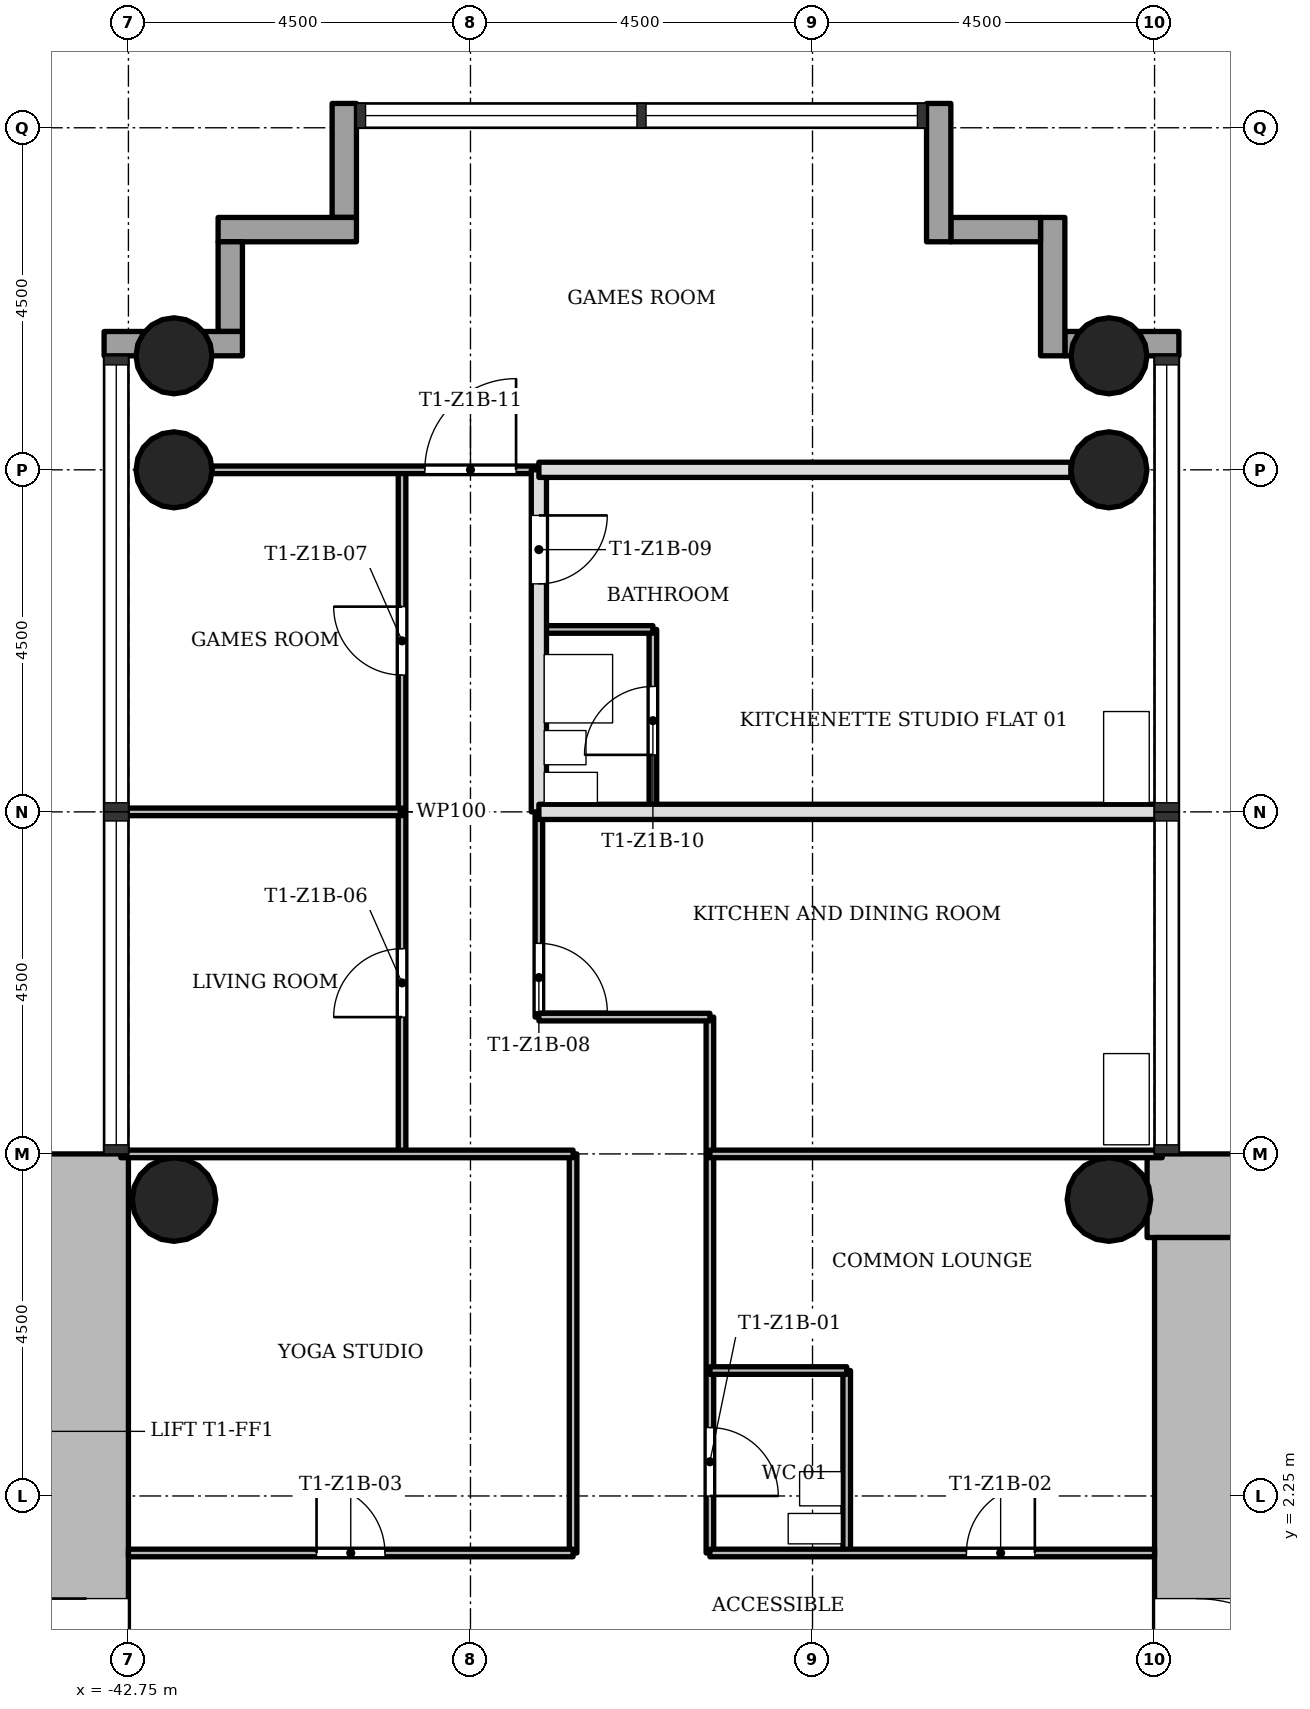
"""IFC4 building model, lengths in metres.
Left out: names, types, materials, properties, quantities, classifications, styles, units other than length and angle.
Written with IfcOpenShell. Run it as: python <this file> out.ifc"""

import sys

from ifc_helpers import new_model, si_unit, direction, frame, frame_2d, origin, origin_2d, place, context, subcontext, project, spatial, rectangle, hollow_circle, extrude, element, fill, save


model = new_model("IFC4")
c1 = context("Model", 3, precision=1e-05, world=origin(), true_north=direction((0.0, 1.0)))
c2 = subcontext(c1, "Body", "Model", "MODEL_VIEW")
j1 = project(units=[si_unit("LENGTHUNIT", "METRE"), si_unit("PLANEANGLEUNIT", "RADIAN")], contexts=[c1])
p1 = place(None, origin())
s1 = spatial("IfcSite", under=j1, at=p1, CompositionType="ELEMENT")
p2 = place(p1, origin())
s2 = spatial("IfcBuilding", under=s1, at=p2, CompositionType="ELEMENT")
p3 = place(p2, frame((0.0, 0.0, 41.5)))
s3 = spatial("IfcBuildingStorey", under=s2, at=p3, CompositionType="ELEMENT", Elevation=41.5)
p4 = place(p3, frame((-21.35, 6.2, 0.0), z_axis=(0.0, 0.0, 1.0), x_axis=(-1.0, 0.0, 0.0)))
e1 = element("IfcWall", 1, at=p4, inside=s3, PredefinedType="SHEAR", context=c2, shape_type="SweptSolid", body=[
    extrude(rectangle(XDim=7.998, YDim=1.1, at=frame_2d((3.999, 0.0))), origin(), (0.0, 0.0, 1.0), 3.4),
])
p5 = place(p3, frame((-28.7, 5.65, 0.0), z_axis=(0.0, 0.0, 1.0), x_axis=(0.0, -1.0, 0.0)))
e2 = element("IfcWall", 2, at=p5, inside=s3, PredefinedType="SHEAR", context=c2, shape_type="SweptSolid", body=[
    extrude(rectangle(XDim=12.4, YDim=1.1, at=frame_2d((6.2, 0.0))), origin(), (0.0, 0.0, 1.0), 3.4),
])
p6 = place(p5, frame((4.75, 0.0, 0.0)))
e3 = element("IfcOpeningElement", 3, at=p6, cuts=e2, PredefinedType="OPENING", context=c2, shape_type="SweptSolid", body=[
    extrude(rectangle(XDim=1.8, YDim=2.1, at=frame_2d((0.9, 1.05))), frame((0.0, 0.56, 0.0), z_axis=(0.0, -1.0, 0.0), x_axis=(1.0, 0.0, 0.0)), (0.0, 0.0, 1.0), 1.12),
])
p7 = place(p3, frame((-43.3, -5.65, 0.0), z_axis=(0.0, 0.0, 1.0), x_axis=(0.0, 1.0, 0.0)))
e4 = element("IfcWall", 4, at=p7, inside=s3, PredefinedType="SHEAR", context=c2, shape_type="SweptSolid", body=[
    extrude(rectangle(XDim=12.4, YDim=1.1, at=frame_2d((6.2, 0.0))), origin(), (0.0, 0.0, 1.0), 3.4),
])
p8 = place(p7, frame((4.75, 0.0, 0.0)))
e5 = element("IfcOpeningElement", 5, at=p8, cuts=e4, PredefinedType="OPENING", context=c2, shape_type="SweptSolid", body=[
    extrude(rectangle(XDim=1.8, YDim=2.1, at=frame_2d((0.9, 1.05))), frame((0.0, 0.56, 0.0), z_axis=(0.0, -1.0, 0.0), x_axis=(1.0, 0.0, 0.0)), (0.0, 0.0, 1.0), 1.12),
])
for number, where, z_axis, x_axis in (
    (6, (-29.85, 15.75, 0.0), (0.0, 0.0, 1.0), (1.0, 0.0, 0.0)),
    (7, (-42.15, 15.75, 0.0), (0.0, 0.0, 1.0), (1.0, 0.0, 0.0)),
    (8, (-29.85, 17.25, 0.0), (0.0, 0.0, 1.0), (1.0, 0.0, 0.0)),
    (9, (-42.15, 17.25, 0.0), (0.0, 0.0, 1.0), (1.0, 0.0, 0.0)),
):
    element("IfcColumn", number, at=place(p3, frame(where, z_axis=z_axis, x_axis=x_axis)), inside=s3, PredefinedType="COLUMN", context=c2, shape_type="SweptSolid", body=[
        extrude(hollow_circle(Radius=0.5, WallThickness=0.036, at=origin_2d()), origin(), (0.0, 0.0, 1.0), 3.4),
    ])
for number, where, z_axis, x_axis in (
    (10, (-29.85, 6.15, 0.0), (0.0, 0.0, 1.0), (1.0, 0.0, 0.0)),
    (11, (-42.15, 6.15, 0.0), (0.0, 0.0, 1.0), (1.0, 0.0, 0.0)),
):
    element("IfcColumn", number, at=place(p3, frame(where, z_axis=z_axis, x_axis=x_axis)), inside=s3, PredefinedType="COLUMN", context=c2, shape_type="SweptSolid", body=[
        extrude(hollow_circle(Radius=0.55, WallThickness=0.04, at=origin_2d()), origin(), (0.0, 0.0, 1.0), 3.4),
    ])
p9 = place(p3, frame((-28.93, 17.41, -0.3), z_axis=(0.0, 0.0, 1.0), x_axis=(-1.0, 0.0, 0.0)))
e12 = element("IfcWall", 12, at=p9, inside=s3, PredefinedType="STANDARD", context=c2, shape_type="SweptSolid", body=[
    extrude(rectangle(XDim=1.5, YDim=0.32, at=frame_2d((0.75, 0.0))), origin(), (0.0, 0.0, 1.0), 3.4),
])
p10 = place(p3, frame((-30.59, 17.25, -0.3), z_axis=(0.0, 0.0, 1.0), x_axis=(0.0, 1.0, 0.0)))
e13 = element("IfcWall", 13, at=p10, inside=s3, PredefinedType="STANDARD", context=c2, shape_type="SweptSolid", body=[
    extrude(rectangle(XDim=1.82, YDim=0.32, at=frame_2d((0.91, 0.0))), origin(), (0.0, 0.0, 1.0), 3.4),
])
p11 = place(p3, frame((-30.75, 18.91, -0.3), z_axis=(0.0, 0.0, 1.0), x_axis=(-1.0, 0.0, 0.0)))
e14 = element("IfcWall", 14, at=p11, inside=s3, PredefinedType="STANDARD", context=c2, shape_type="SweptSolid", body=[
    extrude(rectangle(XDim=1.18, YDim=0.32, at=frame_2d((0.59, 0.0))), origin(), (0.0, 0.0, 1.0), 3.4),
])
p12 = place(p3, frame((-32.09, 18.75, -0.3), z_axis=(0.0, 0.0, 1.0), x_axis=(0.0, 1.0, 0.0)))
e15 = element("IfcWall", 15, at=p12, inside=s3, PredefinedType="STANDARD", context=c2, shape_type="SweptSolid", body=[
    extrude(rectangle(XDim=1.82, YDim=0.32, at=frame_2d((0.91, 0.0))), origin(), (0.0, 0.0, 1.0), 3.4),
])
p13 = place(p3, frame((-39.91, 20.57, -0.3), z_axis=(0.0, 0.0, 1.0), x_axis=(0.0, -1.0, 0.0)))
e16 = element("IfcWall", 16, at=p13, inside=s3, PredefinedType="STANDARD", context=c2, shape_type="SweptSolid", body=[
    extrude(rectangle(XDim=1.5, YDim=0.32, at=frame_2d((0.75, 0.0))), origin(), (0.0, 0.0, 1.0), 3.4),
])
p14 = place(p3, frame((-39.75, 18.91, -0.3), z_axis=(0.0, 0.0, 1.0), x_axis=(-1.0, 0.0, 0.0)))
e17 = element("IfcWall", 17, at=p14, inside=s3, PredefinedType="STANDARD", context=c2, shape_type="SweptSolid", body=[
    extrude(rectangle(XDim=1.82, YDim=0.32, at=frame_2d((0.91, 0.0))), origin(), (0.0, 0.0, 1.0), 3.4),
])
p15 = place(p3, frame((-41.41, 18.75, -0.3), z_axis=(0.0, 0.0, 1.0), x_axis=(0.0, -1.0, 0.0)))
e18 = element("IfcWall", 18, at=p15, inside=s3, PredefinedType="STANDARD", context=c2, shape_type="SweptSolid", body=[
    extrude(rectangle(XDim=1.18, YDim=0.32, at=frame_2d((0.59, 0.0))), origin(), (0.0, 0.0, 1.0), 3.4),
])
p16 = place(p3, frame((-41.25, 17.41, -0.3), z_axis=(0.0, 0.0, 1.0), x_axis=(-1.0, 0.0, 0.0)))
e19 = element("IfcWall", 19, at=p16, inside=s3, PredefinedType="STANDARD", context=c2, shape_type="SweptSolid", body=[
    extrude(rectangle(XDim=1.82, YDim=0.32, at=frame_2d((0.91, 0.0))), origin(), (0.0, 0.0, 1.0), 3.4),
])
p17 = place(p3, frame((-39.15, 6.75, 0.0), z_axis=(0.0, 0.0, 1.0), x_axis=(0.0, 1.0, 0.0)))
e20 = element("IfcWall", 20, at=p17, inside=s3, PredefinedType="PARTITIONING", context=c2, shape_type="SweptSolid", body=[
    extrude(rectangle(XDim=9.0, YDim=0.1, at=frame_2d((4.5, 0.0))), origin(), (0.0, 0.0, 1.0), 3.0),
])
p18 = place(p17, frame((1.8, 0.0, 0.0)))
e21 = element("IfcOpeningElement", 21, at=p18, cuts=e20, PredefinedType="OPENING", context=c2, shape_type="SweptSolid", body=[
    extrude(rectangle(XDim=0.9, YDim=2.1, at=frame_2d((0.45, 1.05))), frame((0.0, 0.06, 0.0), z_axis=(0.0, -1.0, 0.0), x_axis=(1.0, 0.0, 0.0)), (0.0, 0.0, 1.0), 0.12),
])
p19 = place(p17, frame((6.3, 0.0, 0.0)))
e22 = element("IfcOpeningElement", 22, at=p19, cuts=e20, PredefinedType="OPENING", context=c2, shape_type="SweptSolid", body=[
    extrude(rectangle(XDim=0.9, YDim=2.1, at=frame_2d((0.45, 1.05))), frame((0.0, 0.06, 0.0), z_axis=(0.0, -1.0, 0.0), x_axis=(1.0, 0.0, 0.0)), (0.0, 0.0, 1.0), 0.12),
])
p20 = place(p3, frame((-37.35, 8.55, 0.0), z_axis=(0.0, 0.0, 1.0), x_axis=(0.0, 1.0, 0.0)))
e23 = element("IfcWall", 23, at=p20, inside=s3, PredefinedType="PARTITIONING", context=c2, shape_type="SweptSolid", body=[
    extrude(rectangle(XDim=2.7, YDim=0.1, at=frame_2d((1.35, 0.0))), origin(), (0.0, 0.0, 1.0), 3.0),
])
p21 = place(p20, frame((0.07, 0.0, 0.0)))
e24 = element("IfcOpeningElement", 24, at=p21, cuts=e23, PredefinedType="OPENING", context=c2, shape_type="SweptSolid", body=[
    extrude(rectangle(XDim=0.9, YDim=2.1, at=frame_2d((0.45, 1.05))), frame((0.0, 0.06, 0.0), z_axis=(0.0, -1.0, 0.0), x_axis=(1.0, 0.0, 0.0)), (0.0, 0.0, 1.0), 0.12),
])
p22 = place(p3, frame((-37.35, 11.25, 0.0), z_axis=(0.0, 0.0, 1.0), x_axis=(0.0, 1.0, 0.0)))
e25 = element("IfcWall", 25, at=p22, inside=s3, PredefinedType="SOLIDWALL", context=c2, shape_type="SweptSolid", body=[
    extrude(rectangle(XDim=4.5, YDim=0.2, at=frame_2d((2.25, 0.0))), origin(), (0.0, 0.0, 1.0), 3.0),
])
p23 = place(p22, frame((3.0, 0.0, 0.0)))
e26 = element("IfcOpeningElement", 26, at=p23, cuts=e25, PredefinedType="OPENING", context=c2, shape_type="SweptSolid", body=[
    extrude(rectangle(XDim=0.9, YDim=2.1, at=frame_2d((0.45, 1.05))), frame((0.0, 0.11, 0.0), z_axis=(0.0, -1.0, 0.0), x_axis=(1.0, 0.0, 0.0)), (0.0, 0.0, 1.0), 0.22),
])
p24 = place(p3, frame((-36.9, 1.5, 0.0), z_axis=(0.0, 0.0, 1.0), x_axis=(0.0, 1.0, 0.0)))
e27 = element("IfcWall", 27, at=p24, inside=s3, PredefinedType="PARTITIONING", context=c2, shape_type="SweptSolid", body=[
    extrude(rectangle(XDim=5.25, YDim=0.1, at=frame_2d((2.625, 0.0))), origin(), (0.0, 0.0, 1.0), 3.0),
])
p25 = place(p3, frame((-35.85, 11.25, 0.0), z_axis=(0.0, 0.0, 1.0), x_axis=(0.0, 1.0, 0.0)))
e28 = element("IfcWall", 28, at=p25, inside=s3, PredefinedType="PARTITIONING", context=c2, shape_type="SweptSolid", body=[
    extrude(rectangle(XDim=2.4, YDim=0.1, at=frame_2d((1.2, 0.0))), origin(), (0.0, 0.0, 1.0), 3.0),
])
p26 = place(p25, frame((0.75, 0.0, 0.0)))
e29 = element("IfcOpeningElement", 29, at=p26, cuts=e28, PredefinedType="OPENING", context=c2, shape_type="SweptSolid", body=[
    extrude(rectangle(XDim=0.9, YDim=2.1, at=frame_2d((0.45, 1.05))), frame((0.0, 0.06, 0.0), z_axis=(0.0, -1.0, 0.0), x_axis=(1.0, 0.0, 0.0)), (0.0, 0.0, 1.0), 0.12),
])
p27 = place(p3, frame((-35.1, 1.5, 0.0), z_axis=(0.0, 0.0, 1.0), x_axis=(0.0, 1.0, 0.0)))
e30 = element("IfcWall", 30, at=p27, inside=s3, PredefinedType="PARTITIONING", context=c2, shape_type="SweptSolid", body=[
    extrude(rectangle(XDim=7.05, YDim=0.1, at=frame_2d((3.525, 0.0))), origin(), (0.0, 0.0, 1.0), 3.0),
])
p28 = place(p27, frame((0.75, 0.0, 0.0)))
e31 = element("IfcOpeningElement", 31, at=p28, cuts=e30, PredefinedType="OPENING", context=c2, shape_type="SweptSolid", body=[
    extrude(rectangle(XDim=0.9, YDim=2.1, at=frame_2d((0.45, 1.05))), frame((0.0, 0.06, 0.0), z_axis=(0.0, -1.0, 0.0), x_axis=(1.0, 0.0, 0.0)), (0.0, 0.0, 1.0), 0.12),
])
p29 = place(p3, frame((-33.3, 1.5, 0.0), z_axis=(0.0, 0.0, 1.0), x_axis=(0.0, 1.0, 0.0)))
e32 = element("IfcWall", 32, at=p29, inside=s3, PredefinedType="PARTITIONING", context=c2, shape_type="SweptSolid", body=[
    extrude(rectangle(XDim=2.4, YDim=0.1, at=frame_2d((1.2, 0.0))), origin(), (0.0, 0.0, 1.0), 3.0),
])
p30 = place(p3, frame((-42.75, 1.5, 0.0), z_axis=(0.0, 0.0, 1.0), x_axis=(1.0, 0.0, 0.0)))
e33 = element("IfcWall", 33, at=p30, inside=s3, PredefinedType="PARTITIONING", context=c2, shape_type="SweptSolid", body=[
    extrude(rectangle(XDim=5.85, YDim=0.1, at=frame_2d((2.925, 0.0))), origin(), (0.0, 0.0, 1.0), 3.0),
])
p31 = place(p30, frame((2.475, 0.0, 0.0)))
e34 = element("IfcOpeningElement", 34, at=p31, cuts=e33, PredefinedType="OPENING", context=c2, shape_type="SweptSolid", body=[
    extrude(rectangle(XDim=0.9, YDim=2.1, at=frame_2d((0.45, 1.05))), frame((0.0, 0.06, 0.0), z_axis=(0.0, -1.0, 0.0), x_axis=(1.0, 0.0, 0.0)), (0.0, 0.0, 1.0), 0.12),
])
p32 = place(p3, frame((-35.1, 1.5, 0.0), z_axis=(0.0, 0.0, 1.0), x_axis=(1.0, 0.0, 0.0)))
e35 = element("IfcWall", 35, at=p32, inside=s3, PredefinedType="PARTITIONING", context=c2, shape_type="SweptSolid", body=[
    extrude(rectangle(XDim=5.85, YDim=0.1, at=frame_2d((2.925, 0.0))), origin(), (0.0, 0.0, 1.0), 3.0),
])
p33 = place(p32, frame((3.375, 0.0, 0.0)))
e36 = element("IfcOpeningElement", 36, at=p33, cuts=e35, PredefinedType="OPENING", context=c2, shape_type="SweptSolid", body=[
    extrude(rectangle(XDim=0.9, YDim=2.1, at=frame_2d((0.45, 1.05))), frame((0.0, 0.06, 0.0), z_axis=(0.0, -1.0, 0.0), x_axis=(1.0, 0.0, 0.0)), (0.0, 0.0, 1.0), 0.12),
])
p34 = place(p3, frame((-35.1, 3.9, 0.0), z_axis=(0.0, 0.0, 1.0), x_axis=(1.0, 0.0, 0.0)))
e37 = element("IfcWall", 37, at=p34, inside=s3, PredefinedType="PARTITIONING", context=c2, shape_type="SweptSolid", body=[
    extrude(rectangle(XDim=1.8, YDim=0.1, at=frame_2d((0.9, 0.0))), origin(), (0.0, 0.0, 1.0), 3.0),
])
for number, where, z_axis, x_axis in (
    (38, (-42.85, 6.75, 0.0), (0.0, 0.0, 1.0), (1.0, 0.0, 0.0)),
    (39, (-35.1, 6.75, 0.0), (0.0, 0.0, 1.0), (1.0, 0.0, 0.0)),
):
    element("IfcWall", number, at=place(p3, frame(where, z_axis=z_axis, x_axis=x_axis)), inside=s3, PredefinedType="PARTITIONING", context=c2, shape_type="SweptSolid", body=[
        extrude(rectangle(XDim=5.95, YDim=0.1, at=frame_2d((2.975, 0.0))), origin(), (0.0, 0.0, 1.0), 3.0),
    ])
p35 = place(p3, frame((-37.35, 8.55, 0.0), z_axis=(0.0, 0.0, 1.0), x_axis=(1.0, 0.0, 0.0)))
e40 = element("IfcWall", 40, at=p35, inside=s3, PredefinedType="PARTITIONING", context=c2, shape_type="SweptSolid", body=[
    extrude(rectangle(XDim=2.25, YDim=0.1, at=frame_2d((1.125, 0.0))), origin(), (0.0, 0.0, 1.0), 3.0),
])
p36 = place(p3, frame((-42.85, 11.25, 0.0), z_axis=(0.0, 0.0, 1.0), x_axis=(1.0, 0.0, 0.0)))
e41 = element("IfcWall", 41, at=p36, inside=s3, PredefinedType="PARTITIONING", context=c2, shape_type="SweptSolid", body=[
    extrude(rectangle(XDim=3.7, YDim=0.1, at=frame_2d((1.85, 0.0))), origin(), (0.0, 0.0, 1.0), 3.0),
])
p37 = place(p3, frame((-37.35, 11.25, 0.0), z_axis=(0.0, 0.0, 1.0), x_axis=(1.0, 0.0, 0.0)))
e42 = element("IfcWall", 42, at=p37, inside=s3, PredefinedType="SOLIDWALL", context=c2, shape_type="SweptSolid", body=[
    extrude(rectangle(XDim=8.2, YDim=0.2, at=frame_2d((4.1, 0.0))), origin(), (0.0, 0.0, 1.0), 3.0),
])
p38 = place(p3, frame((-37.35, 13.65, 0.0), z_axis=(0.0, 0.0, 1.0), x_axis=(1.0, 0.0, 0.0)))
e43 = element("IfcWall", 43, at=p38, inside=s3, PredefinedType="PARTITIONING", context=c2, shape_type="SweptSolid", body=[
    extrude(rectangle(XDim=1.5, YDim=0.1, at=frame_2d((0.75, 0.0))), origin(), (0.0, 0.0, 1.0), 3.0),
])
p39 = place(p3, frame((-41.65, 15.75, 0.0), z_axis=(0.0, 0.0, 1.0), x_axis=(1.0, 0.0, 0.0)))
e44 = element("IfcWall", 44, at=p39, inside=s3, PredefinedType="PARTITIONING", context=c2, shape_type="SweptSolid", body=[
    extrude(rectangle(XDim=4.3, YDim=0.1, at=frame_2d((2.15, 0.0))), origin(), (0.0, 0.0, 1.0), 3.0),
])
p40 = place(p39, frame((2.8, 0.0, 0.0)))
e45 = element("IfcOpeningElement", 45, at=p40, cuts=e44, PredefinedType="OPENING", context=c2, shape_type="SweptSolid", body=[
    extrude(rectangle(XDim=1.2, YDim=2.1, at=frame_2d((0.6, 1.05))), frame((0.0, 0.06, 0.0), z_axis=(0.0, -1.0, 0.0), x_axis=(1.0, 0.0, 0.0)), (0.0, 0.0, 1.0), 0.12),
])
p41 = place(p3, frame((-37.35, 15.75, 0.0), z_axis=(0.0, 0.0, 1.0), x_axis=(1.0, 0.0, 0.0)))
e46 = element("IfcWall", 46, at=p41, inside=s3, PredefinedType="SOLIDWALL", context=c2, shape_type="SweptSolid", body=[
    extrude(rectangle(XDim=7.0, YDim=0.2, at=frame_2d((3.5, 0.0))), origin(), (0.0, 0.0, 1.0), 3.0),
])
p42 = place(p28, origin())
e47 = element("IfcDoor", 47, at=p42, inside=s3, OperationType="SINGLE_SWING_LEFT", PredefinedType="DOOR", context=c2, shape_type="SweptSolid", body=[
    extrude(rectangle(XDim=0.9, YDim=2.1, at=frame_2d((0.45, 1.05))), frame((0.0, 0.025, 0.0), z_axis=(0.0, -1.0, 0.0), x_axis=(1.0, 0.0, 0.0)), (0.0, 0.0, 1.0), 0.05),
])
fill(e31, e47)
p43 = place(p33, origin())
e48 = element("IfcDoor", 48, at=p43, inside=s3, OperationType="SINGLE_SWING_LEFT", PredefinedType="DOOR", context=c2, shape_type="SweptSolid", body=[
    extrude(rectangle(XDim=0.9, YDim=2.1, at=frame_2d((0.45, 1.05))), frame((0.0, 0.025, 0.0), z_axis=(0.0, -1.0, 0.0), x_axis=(1.0, 0.0, 0.0)), (0.0, 0.0, 1.0), 0.05),
])
fill(e36, e48)
p44 = place(p31, origin())
e49 = element("IfcDoor", 49, at=p44, inside=s3, OperationType="SINGLE_SWING_RIGHT", PredefinedType="DOOR", context=c2, shape_type="SweptSolid", body=[
    extrude(rectangle(XDim=0.9, YDim=2.1, at=frame_2d((0.45, 1.05))), frame((0.0, 0.025, 0.0), z_axis=(0.0, -1.0, 0.0), x_axis=(1.0, 0.0, 0.0)), (0.0, 0.0, 1.0), 0.05),
])
fill(e34, e49)
p45 = place(p18, origin())
e50 = element("IfcDoor", 50, at=p45, inside=s3, OperationType="SINGLE_SWING_RIGHT", PredefinedType="DOOR", context=c2, shape_type="SweptSolid", body=[
    extrude(rectangle(XDim=0.9, YDim=2.1, at=frame_2d((0.45, 1.05))), frame((0.0, 0.025, 0.0), z_axis=(0.0, -1.0, 0.0), x_axis=(1.0, 0.0, 0.0)), (0.0, 0.0, 1.0), 0.05),
])
fill(e21, e50)
p46 = place(p19, origin())
e51 = element("IfcDoor", 51, at=p46, inside=s3, OperationType="SINGLE_SWING_LEFT", PredefinedType="DOOR", context=c2, shape_type="SweptSolid", body=[
    extrude(rectangle(XDim=0.9, YDim=2.1, at=frame_2d((0.45, 1.05))), frame((0.0, 0.025, 0.0), z_axis=(0.0, -1.0, 0.0), x_axis=(1.0, 0.0, 0.0)), (0.0, 0.0, 1.0), 0.05),
])
fill(e22, e51)
p47 = place(p21, origin())
e52 = element("IfcDoor", 52, at=p47, inside=s3, OperationType="SINGLE_SWING_LEFT", PredefinedType="DOOR", context=c2, shape_type="SweptSolid", body=[
    extrude(rectangle(XDim=0.9, YDim=2.1, at=frame_2d((0.45, 1.05))), frame((0.0, 0.025, 0.0), z_axis=(0.0, -1.0, 0.0), x_axis=(1.0, 0.0, 0.0)), (0.0, 0.0, 1.0), 0.05),
])
fill(e24, e52)
p48 = place(p23, origin())
e53 = element("IfcDoor", 53, at=p48, inside=s3, OperationType="SINGLE_SWING_RIGHT", PredefinedType="DOOR", context=c2, shape_type="SweptSolid", body=[
    extrude(rectangle(XDim=0.9, YDim=2.1, at=frame_2d((0.45, 1.05))), frame((0.0, 0.025, 0.0), z_axis=(0.0, -1.0, 0.0), x_axis=(1.0, 0.0, 0.0)), (0.0, 0.0, 1.0), 0.05),
])
fill(e26, e53)
p49 = place(p26, origin())
e54 = element("IfcDoor", 54, at=p49, inside=s3, OperationType="SINGLE_SWING_RIGHT", PredefinedType="DOOR", context=c2, shape_type="SweptSolid", body=[
    extrude(rectangle(XDim=0.9, YDim=2.1, at=frame_2d((0.45, 1.05))), frame((0.0, 0.025, 0.0), z_axis=(0.0, -1.0, 0.0), x_axis=(1.0, 0.0, 0.0)), (0.0, 0.0, 1.0), 0.05),
])
fill(e29, e54)
p50 = place(p40, origin())
e55 = element("IfcDoor", 55, at=p50, inside=s3, OperationType="SINGLE_SWING_LEFT", PredefinedType="DOOR", context=c2, shape_type="SweptSolid", body=[
    extrude(rectangle(XDim=1.2, YDim=2.1, at=frame_2d((0.6, 1.05))), frame((0.0, 0.025, 0.0), z_axis=(0.0, -1.0, 0.0), x_axis=(1.0, 0.0, 0.0)), (0.0, 0.0, 1.0), 0.05),
])
fill(e45, e55)
p51 = place(p6, origin())
e56 = element("IfcDoor", 56, at=p51, inside=s3, OperationType="SINGLE_SWING_LEFT", PredefinedType="DOOR", context=c2, shape_type="SweptSolid", body=[
    extrude(rectangle(XDim=1.8, YDim=2.1, at=frame_2d((0.9, 1.05))), frame((0.0, 0.025, 0.0), z_axis=(0.0, -1.0, 0.0), x_axis=(1.0, 0.0, 0.0)), (0.0, 0.0, 1.0), 0.05),
])
fill(e3, e56)
p52 = place(p8, origin())
e57 = element("IfcDoor", 57, at=p52, inside=s3, OperationType="SINGLE_SWING_LEFT", PredefinedType="DOOR", context=c2, shape_type="SweptSolid", body=[
    extrude(rectangle(XDim=1.8, YDim=2.1, at=frame_2d((0.9, 1.05))), frame((0.0, 0.025, 0.0), z_axis=(0.0, -1.0, 0.0), x_axis=(1.0, 0.0, 0.0)), (0.0, 0.0, 1.0), 0.05),
])
fill(e5, e57)
save(model, sys.argv[1])
